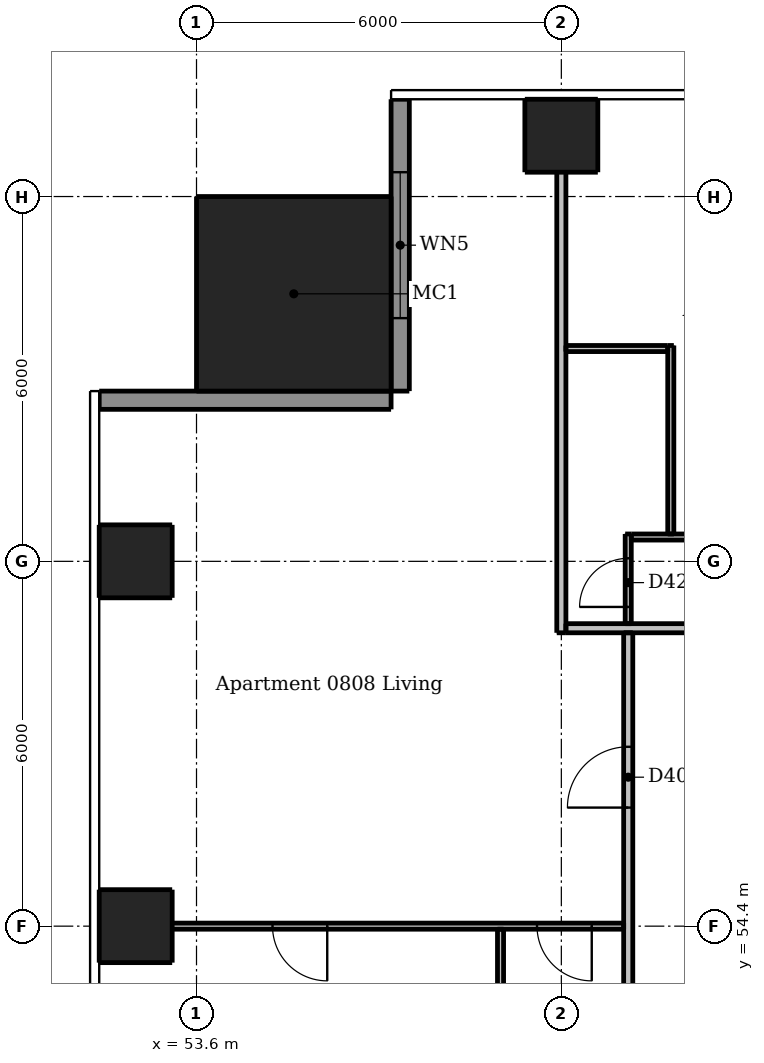
"""IFC4 building model, lengths in metres.
Left out: names, types, materials, properties, quantities, classifications, styles, units other than length and angle.
Written with IfcOpenShell. Run it as: python <this file> out.ifc"""

import sys

from ifc_helpers import new_model, si_unit, direction, frame, frame_2d, origin, origin_2d, place, context, subcontext, project, spatial, rectangle, extrude, element, fill, save


model = new_model("IFC4")
c1 = context("Model", 3, precision=1e-05, world=origin(), true_north=direction((0.0, 1.0)))
c2 = subcontext(c1, "Body", "Model", "MODEL_VIEW")
j1 = project(units=[si_unit("LENGTHUNIT", "METRE"), si_unit("PLANEANGLEUNIT", "RADIAN")], contexts=[c1])
p1 = place(None, origin())
s1 = spatial("IfcSite", under=j1, at=p1, CompositionType="ELEMENT")
p2 = place(p1, origin())
s2 = spatial("IfcBuilding", under=s1, at=p2, CompositionType="ELEMENT")
p3 = place(p2, frame((0.0, 0.0, 33.4)))
s3 = spatial("IfcBuildingStorey", under=s2, at=p3, CompositionType="ELEMENT", Elevation=33.4)
for number, where, z_axis, x_axis in (
    (1, (59.6, 67.4, 0.0), (0.0, 0.0, 1.0), (1.0, 0.0, 0.0)),
    (2, (52.6, 54.4, 0.0), (0.0, 0.0, 1.0), (1.0, 0.0, 0.0)),
    (3, (52.6, 60.4, 0.0), (0.0, 0.0, 1.0), (1.0, 0.0, 0.0)),
):
    element("IfcColumn", number, at=place(p3, frame(where, z_axis=z_axis, x_axis=x_axis)), inside=s3, PredefinedType="COLUMN", context=c2, shape_type="SweptSolid", body=[
        extrude(rectangle(XDim=1.2, YDim=1.2, at=origin_2d()), origin(), (0.0, 0.0, 1.0), 3.05),
    ])
p4 = place(p3, frame((55.2, 64.8, 0.0), z_axis=(0.0, 0.0, 1.0), x_axis=(1.0, 0.0, 0.0)))
e4 = element("IfcColumn", 4, at=p4, inside=s3, PredefinedType="COLUMN", context=c2, shape_type="SweptSolid", body=[
    extrude(rectangle(XDim=3.2, YDim=3.2, at=origin_2d()), origin(), (0.0, 0.0, 1.0), 3.3),
])
p5 = place(p3, frame((56.95, 68.0, 0.0), z_axis=(0.0, 0.0, 1.0), x_axis=(0.0, -1.0, 0.0)))
e5 = element("IfcWall", 5, at=p5, inside=s3, PredefinedType="SOLIDWALL", context=c2, shape_type="SweptSolid", body=[
    extrude(rectangle(XDim=4.8, YDim=0.3, at=frame_2d((2.4, 0.0))), origin(), (0.0, 0.0, 1.0), 3.05),
])
p6 = place(p5, frame((1.2, 0.0, 0.15)))
e6 = element("IfcOpeningElement", 6, at=p6, cuts=e5, PredefinedType="OPENING", context=c2, shape_type="SweptSolid", body=[
    extrude(rectangle(XDim=2.4, YDim=2.1, at=frame_2d((1.2, 1.05))), frame((0.0, 0.16, 0.0), z_axis=(0.0, -1.0, 0.0), x_axis=(1.0, 0.0, 0.0)), (0.0, 0.0, 1.0), 0.32),
])
p7 = place(p3, frame((56.8, 63.05, 0.0), z_axis=(0.0, 0.0, 1.0), x_axis=(-1.0, 0.0, 0.0)))
e7 = element("IfcWall", 7, at=p7, inside=s3, PredefinedType="SOLIDWALL", context=c2, shape_type="SweptSolid", body=[
    extrude(rectangle(XDim=4.8, YDim=0.3, at=frame_2d((2.4, 0.0))), origin(), (0.0, 0.0, 1.0), 3.05),
])
p8 = place(p3, frame((58.6, 54.35, 0.0), z_axis=(0.0, 0.0, 1.0), x_axis=(0.0, -1.0, 0.0)))
e8 = element("IfcWall", 8, at=p8, inside=s3, PredefinedType="PARTITIONING", context=c2, shape_type="SweptSolid", body=[
    extrude(rectangle(XDim=5.875, YDim=0.1, at=frame_2d((2.938, 0.0))), origin(), (0.0, 0.0, 1.0), 3.05),
])
p9 = place(p8, frame((3.75, 0.0, 0.0)))
e9 = element("IfcOpeningElement", 9, at=p9, cuts=e8, PredefinedType="OPENING", context=c2, shape_type="SweptSolid", body=[
    extrude(rectangle(XDim=0.8, YDim=2.1, at=frame_2d((0.4, 1.05))), frame((0.0, 0.06, 0.0), z_axis=(0.0, -1.0, 0.0), x_axis=(1.0, 0.0, 0.0)), (0.0, 0.0, 1.0), 0.12),
])
p10 = place(p3, frame((60.7, 59.375, 0.0), z_axis=(0.0, 0.0, 1.0), x_axis=(0.0, 1.0, 0.0)))
e10 = element("IfcWall", 10, at=p10, inside=s3, PredefinedType="PARTITIONING", context=c2, shape_type="SweptSolid", body=[
    extrude(rectangle(XDim=1.475, YDim=0.1, at=frame_2d((0.738, 0.0))), origin(), (0.0, 0.0, 1.0), 3.05),
])
p11 = place(p10, frame((0.275, 0.0, 0.0)))
e11 = element("IfcOpeningElement", 11, at=p11, cuts=e10, PredefinedType="OPENING", context=c2, shape_type="SweptSolid", body=[
    extrude(rectangle(XDim=0.8, YDim=2.1, at=frame_2d((0.4, 1.05))), frame((0.0, 0.06, 0.0), z_axis=(0.0, -1.0, 0.0), x_axis=(1.0, 0.0, 0.0)), (0.0, 0.0, 1.0), 0.12),
])
p12 = place(p3, frame((61.4, 60.85, 0.0), z_axis=(0.0, 0.0, 1.0), x_axis=(0.0, 1.0, 0.0)))
e12 = element("IfcWall", 12, at=p12, inside=s3, PredefinedType="PARTITIONING", context=c2, shape_type="SweptSolid", body=[
    extrude(rectangle(XDim=3.1, YDim=0.1, at=frame_2d((1.55, 0.0))), origin(), (0.0, 0.0, 1.0), 3.05),
])
p13 = place(p3, frame((59.675, 63.9, 0.0), z_axis=(0.0, 0.0, 1.0), x_axis=(1.0, 0.0, 0.0)))
e13 = element("IfcWall", 13, at=p13, inside=s3, PredefinedType="PARTITIONING", context=c2, shape_type="SweptSolid", body=[
    extrude(rectangle(XDim=1.675, YDim=0.1, at=frame_2d((0.837, 0.0))), origin(), (0.0, 0.0, 1.0), 3.05),
])
p14 = place(p3, frame((60.75, 60.8, 0.0), z_axis=(0.0, 0.0, 1.0), x_axis=(1.0, 0.0, 0.0)))
e14 = element("IfcWall", 14, at=p14, inside=s3, PredefinedType="PARTITIONING", context=c2, shape_type="SweptSolid", body=[
    extrude(rectangle(XDim=16.775, YDim=0.1, at=frame_2d((8.387, 0.0))), origin(), (0.0, 0.0, 1.0), 3.05),
])
p15 = place(p14, frame((3.8, 0.0, 0.0)))
e15 = element("IfcOpeningElement", 15, at=p15, cuts=e14, PredefinedType="OPENING", context=c2, shape_type="SweptSolid", body=[
    extrude(rectangle(XDim=0.9, YDim=2.1, at=frame_2d((0.45, 1.05))), frame((0.0, 0.06, 0.0), z_axis=(0.0, -1.0, 0.0), x_axis=(1.0, 0.0, 0.0)), (0.0, 0.0, 1.0), 0.12),
])
p16 = place(p14, frame((8.9, 0.0, 0.0)))
e16 = element("IfcOpeningElement", 16, at=p16, cuts=e14, PredefinedType="OPENING", context=c2, shape_type="SweptSolid", body=[
    extrude(rectangle(XDim=0.9, YDim=2.1, at=frame_2d((0.45, 1.05))), frame((0.0, 0.06, 0.0), z_axis=(0.0, -1.0, 0.0), x_axis=(1.0, 0.0, 0.0)), (0.0, 0.0, 1.0), 0.12),
])
p17 = place(p14, frame((14.6, 0.0, 0.0)))
e17 = element("IfcOpeningElement", 17, at=p17, cuts=e14, PredefinedType="OPENING", context=c2, shape_type="SweptSolid", body=[
    extrude(rectangle(XDim=0.9, YDim=2.1, at=frame_2d((0.45, 1.05))), frame((0.0, 0.06, 0.0), z_axis=(0.0, -1.0, 0.0), x_axis=(1.0, 0.0, 0.0)), (0.0, 0.0, 1.0), 0.12),
])
p18 = place(p14, frame((11.65, 0.0, 0.0)))
e18 = element("IfcOpeningElement", 18, at=p18, cuts=e14, PredefinedType="OPENING", context=c2, shape_type="SweptSolid", body=[
    extrude(rectangle(XDim=0.8, YDim=2.1, at=frame_2d((0.4, 1.05))), frame((0.0, 0.06, 0.0), z_axis=(0.0, -1.0, 0.0), x_axis=(1.0, 0.0, 0.0)), (0.0, 0.0, 1.0), 0.12),
])
p19 = place(p3, frame((60.625, 54.4, 0.0), z_axis=(0.0, 0.0, 1.0), x_axis=(-1.0, 0.0, 0.0)))
e19 = element("IfcWall", 19, at=p19, inside=s3, PredefinedType="PARTITIONING", context=c2, shape_type="SweptSolid", body=[
    extrude(rectangle(XDim=8.625, YDim=0.1, at=frame_2d((4.312, 0.0))), origin(), (0.0, 0.0, 1.0), 2.516),
])
p20 = place(p19, frame((0.525, 0.0, 0.0)))
e20 = element("IfcOpeningElement", 20, at=p20, cuts=e19, PredefinedType="OPENING", context=c2, shape_type="SweptSolid", body=[
    extrude(rectangle(XDim=0.9, YDim=2.1, at=frame_2d((0.45, 1.05))), frame((0.0, 0.06, 0.0), z_axis=(0.0, -1.0, 0.0), x_axis=(1.0, 0.0, 0.0)), (0.0, 0.0, 1.0), 0.12),
])
p21 = place(p19, frame((4.875, 0.0, 0.0)))
e21 = element("IfcOpeningElement", 21, at=p21, cuts=e19, PredefinedType="OPENING", context=c2, shape_type="SweptSolid", body=[
    extrude(rectangle(XDim=0.9, YDim=2.1, at=frame_2d((0.45, 1.05))), frame((0.0, 0.06, 0.0), z_axis=(0.0, -1.0, 0.0), x_axis=(1.0, 0.0, 0.0)), (0.0, 0.0, 1.0), 0.12),
])
p22 = place(p3, frame((59.6, 59.225, 0.0), z_axis=(0.0, 0.0, 1.0), x_axis=(0.0, 1.0, 0.0)))
e22 = element("IfcWall", 22, at=p22, inside=s3, PredefinedType="PARTITIONING", context=c2, shape_type="SweptSolid", body=[
    extrude(rectangle(XDim=8.775, YDim=0.15, at=frame_2d((4.387, 0.0))), origin(), (0.0, 0.0, 1.0), 2.51),
])
p23 = place(p3, frame((60.7, 30.325, 0.0), z_axis=(0.0, 0.0, 1.0), x_axis=(0.0, 1.0, 0.0)))
e23 = element("IfcWall", 23, at=p23, inside=s3, PredefinedType="PARTITIONING", context=c2, shape_type="SweptSolid", body=[
    extrude(rectangle(XDim=28.9, YDim=0.15, at=frame_2d((14.45, 0.0))), origin(), (0.0, 0.0, 1.0), 3.05),
])
p24 = place(p23, frame((9.225, 0.0, 0.0)))
e24 = element("IfcOpeningElement", 24, at=p24, cuts=e23, PredefinedType="OPENING", context=c2, shape_type="SweptSolid", body=[
    extrude(rectangle(XDim=1.0, YDim=2.1, at=frame_2d((0.5, 1.05))), frame((0.0, 0.085, 0.0), z_axis=(0.0, -1.0, 0.0), x_axis=(1.0, 0.0, 0.0)), (0.0, 0.0, 1.0), 0.17),
])
p25 = place(p23, frame((26.025, 0.0, 0.0)))
e25 = element("IfcOpeningElement", 25, at=p25, cuts=e23, PredefinedType="OPENING", context=c2, shape_type="SweptSolid", body=[
    extrude(rectangle(XDim=1.0, YDim=2.1, at=frame_2d((0.5, 1.05))), frame((0.0, 0.085, 0.0), z_axis=(0.0, -1.0, 0.0), x_axis=(1.0, 0.0, 0.0)), (0.0, 0.0, 1.0), 0.17),
])
p26 = place(p3, frame((59.675, 59.3, 0.0), z_axis=(0.0, 0.0, 1.0), x_axis=(1.0, 0.0, 0.0)))
e26 = element("IfcWall", 26, at=p26, inside=s3, PredefinedType="PARTITIONING", context=c2, shape_type="SweptSolid", body=[
    extrude(rectangle(XDim=28.55, YDim=0.15, at=frame_2d((14.275, 0.0))), origin(), (0.0, 0.0, 1.0), 3.05),
])
p27 = place(p26, frame((8.975, 0.0, 0.0)))
e27 = element("IfcOpeningElement", 27, at=p27, cuts=e26, PredefinedType="OPENING", context=c2, shape_type="SweptSolid", body=[
    extrude(rectangle(XDim=1.0, YDim=2.1, at=frame_2d((0.5, 1.05))), frame((0.0, 0.085, 0.0), z_axis=(0.0, -1.0, 0.0), x_axis=(1.0, 0.0, 0.0)), (0.0, 0.0, 1.0), 0.17),
])
p28 = place(p26, frame((25.775, 0.0, 0.0)))
e28 = element("IfcOpeningElement", 28, at=p28, cuts=e26, PredefinedType="OPENING", context=c2, shape_type="SweptSolid", body=[
    extrude(rectangle(XDim=1.0, YDim=2.1, at=frame_2d((0.5, 1.05))), frame((0.0, 0.085, 0.0), z_axis=(0.0, -1.0, 0.0), x_axis=(1.0, 0.0, 0.0)), (0.0, 0.0, 1.0), 0.17),
])
p29 = place(p6, origin())
e29 = element("IfcWindow", 29, at=p29, inside=s3, PartitioningType="DOUBLE_PANEL_VERTICAL", PredefinedType="WINDOW", context=c2, shape_type="SweptSolid", body=[
    extrude(rectangle(XDim=2.4, YDim=2.1, at=frame_2d((1.2, 1.05))), frame((0.0, 0.03, 0.0), z_axis=(0.0, -1.0, 0.0), x_axis=(1.0, 0.0, 0.0)), (0.0, 0.0, 1.0), 0.06),
])
fill(e6, e29)
p30 = place(p11, origin())
e30 = element("IfcDoor", 30, at=p30, inside=s3, OperationType="SINGLE_SWING_LEFT", PredefinedType="DOOR", context=c2, shape_type="SweptSolid", body=[
    extrude(rectangle(XDim=0.8, YDim=2.1, at=frame_2d((0.4, 1.05))), frame((0.0, 0.025, 0.0), z_axis=(0.0, -1.0, 0.0), x_axis=(1.0, 0.0, 0.0)), (0.0, 0.0, 1.0), 0.05),
])
fill(e11, e30)
p31 = place(p25, origin())
e31 = element("IfcDoor", 31, at=p31, inside=s3, OperationType="SINGLE_SWING_LEFT", PredefinedType="DOOR", context=c2, shape_type="SweptSolid", body=[
    extrude(rectangle(XDim=1.0, YDim=2.1, at=frame_2d((0.5, 1.05))), frame((0.0, 0.025, 0.0), z_axis=(0.0, -1.0, 0.0), x_axis=(1.0, 0.0, 0.0)), (0.0, 0.0, 1.0), 0.05),
])
fill(e25, e31)
p32 = place(p20, origin())
e32 = element("IfcDoor", 32, at=p32, inside=s3, OperationType="SINGLE_SWING_LEFT", PredefinedType="DOOR", context=c2, shape_type="SweptSolid", body=[
    extrude(rectangle(XDim=0.9, YDim=2.1, at=frame_2d((0.45, 1.05))), frame((0.0, 0.025, 0.0), z_axis=(0.0, -1.0, 0.0), x_axis=(1.0, 0.0, 0.0)), (0.0, 0.0, 1.0), 0.05),
])
fill(e20, e32)
p33 = place(p21, origin())
e33 = element("IfcDoor", 33, at=p33, inside=s3, OperationType="SINGLE_SWING_LEFT", PredefinedType="DOOR", context=c2, shape_type="SweptSolid", body=[
    extrude(rectangle(XDim=0.9, YDim=2.1, at=frame_2d((0.45, 1.05))), frame((0.0, 0.025, 0.0), z_axis=(0.0, -1.0, 0.0), x_axis=(1.0, 0.0, 0.0)), (0.0, 0.0, 1.0), 0.05),
])
fill(e21, e33)
save(model, sys.argv[1])
